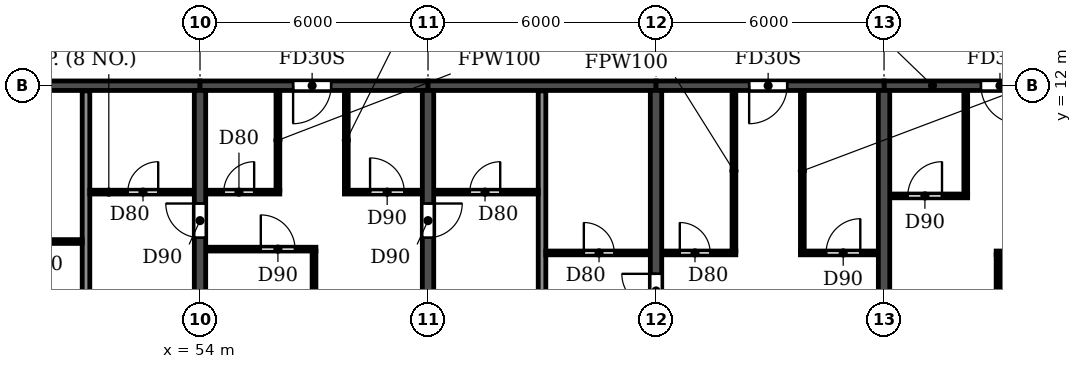
"""IFC4 building model, lengths in metres.
Left out: names, types, materials, properties, quantities, classifications, styles, units other than length and angle.
Written with IfcOpenShell. Run it as: python <this file> out.ifc"""

import sys

from ifc_helpers import new_model, si_unit, direction, frame, frame_2d, origin, place, context, subcontext, project, spatial, rectangle, extrude, element, fill, save


model = new_model("IFC4")
c1 = context("Model", 3, precision=1e-05, world=origin(), true_north=direction((0.0, 1.0)))
c2 = subcontext(c1, "Body", "Model", "MODEL_VIEW")
j1 = project(units=[si_unit("LENGTHUNIT", "METRE"), si_unit("PLANEANGLEUNIT", "RADIAN")], contexts=[c1])
p1 = place(None, origin())
s1 = spatial("IfcSite", under=j1, at=p1, CompositionType="ELEMENT")
p2 = place(p1, origin())
s2 = spatial("IfcBuilding", under=s1, at=p2, CompositionType="ELEMENT")
p3 = place(p2, frame((0.0, 0.0, 162.0)))
s3 = spatial("IfcBuildingStorey", under=s2, at=p3, CompositionType="ELEMENT", Elevation=162.0)
p4 = place(p3, frame((54.0, 0.2, 0.0), z_axis=(0.0, 0.0, 1.0), x_axis=(0.0, 1.0, 0.0)))
e1 = element("IfcWall", 1, at=p4, inside=s3, PredefinedType="SHEAR", context=c2, shape_type="SweptSolid", body=[
    extrude(rectangle(XDim=11.675, YDim=0.3, at=frame_2d((5.837, 0.0))), origin(), (0.0, 0.0, 1.0), 2.95),
])
p5 = place(p4, frame((7.8, 0.0, 0.0)))
e2 = element("IfcOpeningElement", 2, at=p5, cuts=e1, PredefinedType="OPENING", context=c2, shape_type="SweptSolid", body=[
    extrude(rectangle(XDim=0.9, YDim=2.1, at=frame_2d((0.45, 1.05))), frame((0.0, 0.16, 0.0), z_axis=(0.0, -1.0, 0.0), x_axis=(1.0, 0.0, 0.0)), (0.0, 0.0, 1.0), 0.32),
])
p6 = place(p3, frame((60.0, 0.2, 0.0), z_axis=(0.0, 0.0, 1.0), x_axis=(0.0, 1.0, 0.0)))
e3 = element("IfcWall", 3, at=p6, inside=s3, PredefinedType="SHEAR", context=c2, shape_type="SweptSolid", body=[
    extrude(rectangle(XDim=11.675, YDim=0.3, at=frame_2d((5.837, 0.0))), origin(), (0.0, 0.0, 1.0), 2.95),
])
p7 = place(p6, frame((7.8, 0.0, 0.0)))
e4 = element("IfcOpeningElement", 4, at=p7, cuts=e3, PredefinedType="OPENING", context=c2, shape_type="SweptSolid", body=[
    extrude(rectangle(XDim=0.9, YDim=2.1, at=frame_2d((0.45, 1.05))), frame((0.0, 0.16, 0.0), z_axis=(0.0, -1.0, 0.0), x_axis=(1.0, 0.0, 0.0)), (0.0, 0.0, 1.0), 0.32),
])
p8 = place(p3, frame((66.0, 0.2, 0.0), z_axis=(0.0, 0.0, 1.0), x_axis=(0.0, 1.0, 0.0)))
e5 = element("IfcWall", 5, at=p8, inside=s3, PredefinedType="SHEAR", context=c2, shape_type="SweptSolid", body=[
    extrude(rectangle(XDim=11.675, YDim=0.3, at=frame_2d((5.837, 0.0))), origin(), (0.0, 0.0, 1.0), 2.95),
])
p9 = place(p8, frame((5.95, 0.0, 0.0)))
e6 = element("IfcOpeningElement", 6, at=p9, cuts=e5, PredefinedType="OPENING", context=c2, shape_type="SweptSolid", body=[
    extrude(rectangle(XDim=0.9, YDim=2.1, at=frame_2d((0.45, 1.05))), frame((0.0, 0.16, 0.0), z_axis=(0.0, -1.0, 0.0), x_axis=(1.0, 0.0, 0.0)), (0.0, 0.0, 1.0), 0.32),
])
p10 = place(p3, frame((72.0, 0.2, 0.0), z_axis=(0.0, 0.0, 1.0), x_axis=(0.0, 1.0, 0.0)))
e7 = element("IfcWall", 7, at=p10, inside=s3, PredefinedType="SHEAR", context=c2, shape_type="SweptSolid", body=[
    extrude(rectangle(XDim=11.675, YDim=0.3, at=frame_2d((5.837, 0.0))), origin(), (0.0, 0.0, 1.0), 2.95),
])
p11 = place(p3, frame((48.0, 12.0, 0.0), z_axis=(0.0, 0.0, 1.0), x_axis=(1.0, 0.0, 0.0)))
e8 = element("IfcWall", 8, at=p11, inside=s3, PredefinedType="SHEAR", context=c2, shape_type="SweptSolid", body=[
    extrude(rectangle(XDim=6.0, YDim=0.25, at=frame_2d((3.0, 0.0))), origin(), (0.0, 0.0, 1.0), 2.35),
])
p12 = place(p3, frame((54.0, 12.0, 0.0), z_axis=(0.0, 0.0, 1.0), x_axis=(1.0, 0.0, 0.0)))
e9 = element("IfcWall", 9, at=p12, inside=s3, PredefinedType="SHEAR", context=c2, shape_type="SweptSolid", body=[
    extrude(rectangle(XDim=6.0, YDim=0.25, at=frame_2d((3.0, 0.0))), origin(), (0.0, 0.0, 1.0), 2.35),
])
p13 = place(p12, frame((2.45, 0.0, 0.0)))
e10 = element("IfcOpeningElement", 10, at=p13, cuts=e9, PredefinedType="OPENING", context=c2, shape_type="SweptSolid", body=[
    extrude(rectangle(XDim=1.0, YDim=2.1, at=frame_2d((0.5, 1.05))), frame((0.0, 0.135, 0.0), z_axis=(0.0, -1.0, 0.0), x_axis=(1.0, 0.0, 0.0)), (0.0, 0.0, 1.0), 0.27),
])
p14 = place(p3, frame((60.0, 12.0, 0.0), z_axis=(0.0, 0.0, 1.0), x_axis=(1.0, 0.0, 0.0)))
e11 = element("IfcWall", 11, at=p14, inside=s3, PredefinedType="SHEAR", context=c2, shape_type="SweptSolid", body=[
    extrude(rectangle(XDim=6.0, YDim=0.25, at=frame_2d((3.0, 0.0))), origin(), (0.0, 0.0, 1.0), 2.35),
])
p15 = place(p3, frame((66.0, 12.0, 0.0), z_axis=(0.0, 0.0, 1.0), x_axis=(1.0, 0.0, 0.0)))
e12 = element("IfcWall", 12, at=p15, inside=s3, PredefinedType="SHEAR", context=c2, shape_type="SweptSolid", body=[
    extrude(rectangle(XDim=6.0, YDim=0.25, at=frame_2d((3.0, 0.0))), origin(), (0.0, 0.0, 1.0), 2.35),
])
p16 = place(p15, frame((2.45, 0.0, 0.0)))
e13 = element("IfcOpeningElement", 13, at=p16, cuts=e12, PredefinedType="OPENING", context=c2, shape_type="SweptSolid", body=[
    extrude(rectangle(XDim=1.0, YDim=2.1, at=frame_2d((0.5, 1.05))), frame((0.0, 0.135, 0.0), z_axis=(0.0, -1.0, 0.0), x_axis=(1.0, 0.0, 0.0)), (0.0, 0.0, 1.0), 0.27),
])
p17 = place(p3, frame((72.0, 12.0, 0.0), z_axis=(0.0, 0.0, 1.0), x_axis=(1.0, 0.0, 0.0)))
e14 = element("IfcWall", 14, at=p17, inside=s3, PredefinedType="SHEAR", context=c2, shape_type="SweptSolid", body=[
    extrude(rectangle(XDim=6.0, YDim=0.25, at=frame_2d((3.0, 0.0))), origin(), (0.0, 0.0, 1.0), 2.35),
])
p18 = place(p17, frame((2.55, 0.0, 0.0)))
e15 = element("IfcOpeningElement", 15, at=p18, cuts=e14, PredefinedType="OPENING", context=c2, shape_type="SweptSolid", body=[
    extrude(rectangle(XDim=1.0, YDim=2.1, at=frame_2d((0.5, 1.05))), frame((0.0, 0.135, 0.0), z_axis=(0.0, -1.0, 0.0), x_axis=(1.0, 0.0, 0.0)), (0.0, 0.0, 1.0), 0.27),
])
for number, where, z_axis, x_axis in (
    (16, (51.0, 0.06, 0.0), (0.0, 0.0, 1.0), (0.0, 1.0, 0.0)),
    (17, (63.0, 0.06, 0.0), (0.0, 0.0, 1.0), (0.0, 1.0, 0.0)),
):
    element("IfcWall", number, at=place(p3, frame(where, z_axis=z_axis, x_axis=x_axis)), inside=s3, PredefinedType="PARTITIONING", context=c2, shape_type="SweptSolid", body=[
        extrude(rectangle(XDim=11.805, YDim=0.2, at=frame_2d((5.902, 0.0))), origin(), (0.0, 0.0, 1.0), 2.95),
    ])
p19 = place(p3, frame((63.1, 7.6, 0.0), z_axis=(0.0, 0.0, 1.0), x_axis=(1.0, 0.0, 0.0)))
e18 = element("IfcWall", 18, at=p19, inside=s3, PredefinedType="PARTITIONING", context=c2, shape_type="SweptSolid", body=[
    extrude(rectangle(XDim=2.74, YDim=0.1, at=frame_2d((1.37, 0.0))), origin(), (0.0, 0.0, 1.0), 2.95),
])
p20 = place(p19, frame((1.0, 0.0, 0.0)))
e19 = element("IfcOpeningElement", 19, at=p20, cuts=e18, PredefinedType="OPENING", context=c2, shape_type="SweptSolid", body=[
    extrude(rectangle(XDim=0.8, YDim=2.1, at=frame_2d((0.4, 1.05))), frame((0.0, 0.06, 0.0), z_axis=(0.0, -1.0, 0.0), x_axis=(1.0, 0.0, 0.0)), (0.0, 0.0, 1.0), 0.12),
])
p21 = place(p3, frame((66.16, 7.6, 0.0), z_axis=(0.0, 0.0, 1.0), x_axis=(1.0, 0.0, 0.0)))
e20 = element("IfcWall", 20, at=p21, inside=s3, PredefinedType="PARTITIONING", context=c2, shape_type="SweptSolid", body=[
    extrude(rectangle(XDim=1.94, YDim=0.1, at=frame_2d((0.97, 0.0))), origin(), (0.0, 0.0, 1.0), 2.95),
])
p22 = place(p21, frame((0.465, 0.0, 0.0)))
e21 = element("IfcOpeningElement", 21, at=p22, cuts=e20, PredefinedType="OPENING", context=c2, shape_type="SweptSolid", body=[
    extrude(rectangle(XDim=0.8, YDim=2.1, at=frame_2d((0.4, 1.05))), frame((0.0, 0.06, 0.0), z_axis=(0.0, -1.0, 0.0), x_axis=(1.0, 0.0, 0.0)), (0.0, 0.0, 1.0), 0.12),
])
p23 = place(p3, frame((69.8, 7.6, 0.0), z_axis=(0.0, 0.0, 1.0), x_axis=(1.0, 0.0, 0.0)))
e22 = element("IfcWall", 22, at=p23, inside=s3, PredefinedType="PARTITIONING", context=c2, shape_type="SweptSolid", body=[
    extrude(rectangle(XDim=2.04, YDim=0.1, at=frame_2d((1.02, 0.0))), origin(), (0.0, 0.0, 1.0), 2.95),
])
p24 = place(p23, frame((0.675, 0.0, 0.0)))
e23 = element("IfcOpeningElement", 23, at=p24, cuts=e22, PredefinedType="OPENING", context=c2, shape_type="SweptSolid", body=[
    extrude(rectangle(XDim=0.9, YDim=2.1, at=frame_2d((0.45, 1.05))), frame((0.0, 0.06, 0.0), z_axis=(0.0, -1.0, 0.0), x_axis=(1.0, 0.0, 0.0)), (0.0, 0.0, 1.0), 0.12),
])
p25 = place(p3, frame((74.95, 7.6, 0.0), z_axis=(0.0, 0.0, 1.0), x_axis=(1.0, 0.0, 0.0)))
e24 = element("IfcWall", 24, at=p25, inside=s3, PredefinedType="PARTITIONING", context=c2, shape_type="SweptSolid", body=[
    extrude(rectangle(XDim=2.89, YDim=0.1, at=frame_2d((1.445, 0.0))), origin(), (0.0, 0.0, 1.0), 2.95),
])
p26 = place(p25, frame((0.55, 0.0, 0.0)))
e25 = element("IfcOpeningElement", 25, at=p26, cuts=e24, PredefinedType="OPENING", context=c2, shape_type="SweptSolid", body=[
    extrude(rectangle(XDim=0.9, YDim=2.1, at=frame_2d((0.45, 1.05))), frame((0.0, 0.06, 0.0), z_axis=(0.0, -1.0, 0.0), x_axis=(1.0, 0.0, 0.0)), (0.0, 0.0, 1.0), 0.12),
])
p27 = place(p3, frame((54.16, 7.7, 0.0), z_axis=(0.0, 0.0, 1.0), x_axis=(1.0, 0.0, 0.0)))
e26 = element("IfcWall", 26, at=p27, inside=s3, PredefinedType="PARTITIONING", context=c2, shape_type="SweptSolid", body=[
    extrude(rectangle(XDim=2.89, YDim=0.1, at=frame_2d((1.445, 0.0))), origin(), (0.0, 0.0, 1.0), 2.95),
])
p28 = place(p27, frame((1.44, 0.0, 0.0)))
e27 = element("IfcOpeningElement", 27, at=p28, cuts=e26, PredefinedType="OPENING", context=c2, shape_type="SweptSolid", body=[
    extrude(rectangle(XDim=0.9, YDim=2.1, at=frame_2d((0.45, 1.05))), frame((0.0, 0.06, 0.0), z_axis=(0.0, -1.0, 0.0), x_axis=(1.0, 0.0, 0.0)), (0.0, 0.0, 1.0), 0.12),
])
p29 = place(p3, frame((48.16, 7.9, 0.0), z_axis=(0.0, 0.0, 1.0), x_axis=(1.0, 0.0, 0.0)))
e28 = element("IfcWall", 28, at=p29, inside=s3, PredefinedType="PARTITIONING", context=c2, shape_type="SweptSolid", body=[
    extrude(rectangle(XDim=2.74, YDim=0.1, at=frame_2d((1.37, 0.0))), origin(), (0.0, 0.0, 1.0), 2.95),
])
p30 = place(p29, frame((0.94, 0.0, 0.0)))
e29 = element("IfcOpeningElement", 29, at=p30, cuts=e28, PredefinedType="OPENING", context=c2, shape_type="SweptSolid", body=[
    extrude(rectangle(XDim=0.8, YDim=2.1, at=frame_2d((0.4, 1.05))), frame((0.0, 0.06, 0.0), z_axis=(0.0, -1.0, 0.0), x_axis=(1.0, 0.0, 0.0)), (0.0, 0.0, 1.0), 0.12),
])
p31 = place(p3, frame((72.16, 9.1, 0.0), z_axis=(0.0, 0.0, 1.0), x_axis=(1.0, 0.0, 0.0)))
e30 = element("IfcWall", 30, at=p31, inside=s3, PredefinedType="PARTITIONING", context=c2, shape_type="SweptSolid", body=[
    extrude(rectangle(XDim=2.04, YDim=0.1, at=frame_2d((1.02, 0.0))), origin(), (0.0, 0.0, 1.0), 2.95),
])
p32 = place(p31, frame((0.465, 0.0, 0.0)))
e31 = element("IfcOpeningElement", 31, at=p32, cuts=e30, PredefinedType="OPENING", context=c2, shape_type="SweptSolid", body=[
    extrude(rectangle(XDim=0.9, YDim=2.1, at=frame_2d((0.45, 1.05))), frame((0.0, 0.06, 0.0), z_axis=(0.0, -1.0, 0.0), x_axis=(1.0, 0.0, 0.0)), (0.0, 0.0, 1.0), 0.12),
])
p33 = place(p3, frame((51.1, 9.2, 0.0), z_axis=(0.0, 0.0, 1.0), x_axis=(1.0, 0.0, 0.0)))
e32 = element("IfcWall", 32, at=p33, inside=s3, PredefinedType="PARTITIONING", context=c2, shape_type="SweptSolid", body=[
    extrude(rectangle(XDim=2.74, YDim=0.1, at=frame_2d((1.37, 0.0))), origin(), (0.0, 0.0, 1.0), 2.95),
])
p34 = place(p33, frame((1.0, 0.0, 0.0)))
e33 = element("IfcOpeningElement", 33, at=p34, cuts=e32, PredefinedType="OPENING", context=c2, shape_type="SweptSolid", body=[
    extrude(rectangle(XDim=0.8, YDim=2.1, at=frame_2d((0.4, 1.05))), frame((0.0, 0.06, 0.0), z_axis=(0.0, -1.0, 0.0), x_axis=(1.0, 0.0, 0.0)), (0.0, 0.0, 1.0), 0.12),
])
p35 = place(p3, frame((54.16, 9.2, 0.0), z_axis=(0.0, 0.0, 1.0), x_axis=(1.0, 0.0, 0.0)))
e34 = element("IfcWall", 34, at=p35, inside=s3, PredefinedType="PARTITIONING", context=c2, shape_type="SweptSolid", body=[
    extrude(rectangle(XDim=1.94, YDim=0.1, at=frame_2d((0.97, 0.0))), origin(), (0.0, 0.0, 1.0), 2.95),
])
p36 = place(p35, frame((0.465, 0.0, 0.0)))
e35 = element("IfcOpeningElement", 35, at=p36, cuts=e34, PredefinedType="OPENING", context=c2, shape_type="SweptSolid", body=[
    extrude(rectangle(XDim=0.8, YDim=2.1, at=frame_2d((0.4, 1.05))), frame((0.0, 0.06, 0.0), z_axis=(0.0, -1.0, 0.0), x_axis=(1.0, 0.0, 0.0)), (0.0, 0.0, 1.0), 0.12),
])
p37 = place(p3, frame((57.8, 9.2, 0.0), z_axis=(0.0, 0.0, 1.0), x_axis=(1.0, 0.0, 0.0)))
e36 = element("IfcWall", 36, at=p37, inside=s3, PredefinedType="PARTITIONING", context=c2, shape_type="SweptSolid", body=[
    extrude(rectangle(XDim=2.04, YDim=0.1, at=frame_2d((1.02, 0.0))), origin(), (0.0, 0.0, 1.0), 2.95),
])
p38 = place(p37, frame((0.675, 0.0, 0.0)))
e37 = element("IfcOpeningElement", 37, at=p38, cuts=e36, PredefinedType="OPENING", context=c2, shape_type="SweptSolid", body=[
    extrude(rectangle(XDim=0.9, YDim=2.1, at=frame_2d((0.45, 1.05))), frame((0.0, 0.06, 0.0), z_axis=(0.0, -1.0, 0.0), x_axis=(1.0, 0.0, 0.0)), (0.0, 0.0, 1.0), 0.12),
])
p39 = place(p3, frame((60.16, 9.2, 0.0), z_axis=(0.0, 0.0, 1.0), x_axis=(1.0, 0.0, 0.0)))
e38 = element("IfcWall", 38, at=p39, inside=s3, PredefinedType="PARTITIONING", context=c2, shape_type="SweptSolid", body=[
    extrude(rectangle(XDim=2.74, YDim=0.1, at=frame_2d((1.37, 0.0))), origin(), (0.0, 0.0, 1.0), 2.95),
])
p40 = place(p39, frame((0.94, 0.0, 0.0)))
e39 = element("IfcOpeningElement", 39, at=p40, cuts=e38, PredefinedType="OPENING", context=c2, shape_type="SweptSolid", body=[
    extrude(rectangle(XDim=0.8, YDim=2.1, at=frame_2d((0.4, 1.05))), frame((0.0, 0.06, 0.0), z_axis=(0.0, -1.0, 0.0), x_axis=(1.0, 0.0, 0.0)), (0.0, 0.0, 1.0), 0.12),
])
p41 = place(p3, frame((56.05, 9.25, 0.0), z_axis=(0.0, 0.0, 1.0), x_axis=(0.0, 1.0, 0.0)))
e40 = element("IfcWall", 40, at=p41, inside=s3, PredefinedType="PARTITIONING", context=c2, shape_type="SweptSolid", body=[
    extrude(rectangle(XDim=2.615, YDim=0.1, at=frame_2d((1.308, 0.0))), origin(), (0.0, 0.0, 1.0), 2.95),
])
p42 = place(p3, frame((57.0, 0.06, 0.0), z_axis=(0.0, 0.0, 1.0), x_axis=(0.0, 1.0, 0.0)))
e41 = element("IfcWall", 41, at=p42, inside=s3, PredefinedType="PARTITIONING", context=c2, shape_type="SweptSolid", body=[
    extrude(rectangle(XDim=7.59, YDim=0.1, at=frame_2d((3.795, 0.0))), origin(), (0.0, 0.0, 1.0), 2.95),
])
p43 = place(p3, frame((57.85, 9.25, 0.0), z_axis=(0.0, 0.0, 1.0), x_axis=(0.0, 1.0, 0.0)))
e42 = element("IfcWall", 42, at=p43, inside=s3, PredefinedType="PARTITIONING", context=c2, shape_type="SweptSolid", body=[
    extrude(rectangle(XDim=2.615, YDim=0.1, at=frame_2d((1.308, 0.0))), origin(), (0.0, 0.0, 1.0), 2.95),
])
for number, where, z_axis, x_axis in (
    (43, (68.05, 7.65, 0.0), (0.0, 0.0, 1.0), (0.0, 1.0, 0.0)),
    (44, (69.85, 7.65, 0.0), (0.0, 0.0, 1.0), (0.0, 1.0, 0.0)),
):
    element("IfcWall", number, at=place(p3, frame(where, z_axis=z_axis, x_axis=x_axis)), inside=s3, PredefinedType="PARTITIONING", context=c2, shape_type="SweptSolid", body=[
        extrude(rectangle(XDim=4.215, YDim=0.1, at=frame_2d((2.107, 0.0))), origin(), (0.0, 0.0, 1.0), 2.95),
    ])
p44 = place(p3, frame((74.15, 9.15, 0.0), z_axis=(0.0, 0.0, 1.0), x_axis=(0.0, 1.0, 0.0)))
e45 = element("IfcWall", 45, at=p44, inside=s3, PredefinedType="PARTITIONING", context=c2, shape_type="SweptSolid", body=[
    extrude(rectangle(XDim=2.715, YDim=0.1, at=frame_2d((1.357, 0.0))), origin(), (0.0, 0.0, 1.0), 2.95),
])
p45 = place(p3, frame((75.0, 0.06, 0.0), z_axis=(0.0, 0.0, 1.0), x_axis=(0.0, 1.0, 0.0)))
e46 = element("IfcWall", 46, at=p45, inside=s3, PredefinedType="PARTITIONING", context=c2, shape_type="SweptSolid", body=[
    extrude(rectangle(XDim=7.49, YDim=0.1, at=frame_2d((3.745, 0.0))), origin(), (0.0, 0.0, 1.0), 2.95),
])
p46 = place(p34, origin())
e47 = element("IfcDoor", 47, at=p46, inside=s3, OperationType="SINGLE_SWING_RIGHT", PredefinedType="DOOR", context=c2, shape_type="SweptSolid", body=[
    extrude(rectangle(XDim=0.8, YDim=2.1, at=frame_2d((0.4, 1.05))), frame((0.0, 0.025, 0.0), z_axis=(0.0, -1.0, 0.0), x_axis=(1.0, 0.0, 0.0)), (0.0, 0.0, 1.0), 0.05),
])
fill(e33, e47)
p47 = place(p40, origin())
e48 = element("IfcDoor", 48, at=p47, inside=s3, OperationType="SINGLE_SWING_RIGHT", PredefinedType="DOOR", context=c2, shape_type="SweptSolid", body=[
    extrude(rectangle(XDim=0.8, YDim=2.1, at=frame_2d((0.4, 1.05))), frame((0.0, 0.025, 0.0), z_axis=(0.0, -1.0, 0.0), x_axis=(1.0, 0.0, 0.0)), (0.0, 0.0, 1.0), 0.05),
])
fill(e39, e48)
p48 = place(p5, origin())
e49 = element("IfcDoor", 49, at=p48, inside=s3, OperationType="SINGLE_SWING_RIGHT", PredefinedType="DOOR", context=c2, shape_type="SweptSolid", body=[
    extrude(rectangle(XDim=0.9, YDim=2.1, at=frame_2d((0.45, 1.05))), frame((0.0, 0.025, 0.0), z_axis=(0.0, -1.0, 0.0), x_axis=(1.0, 0.0, 0.0)), (0.0, 0.0, 1.0), 0.05),
])
fill(e2, e49)
p49 = place(p36, origin())
e50 = element("IfcDoor", 50, at=p49, inside=s3, OperationType="SINGLE_SWING_RIGHT", PredefinedType="DOOR", context=c2, shape_type="SweptSolid", body=[
    extrude(rectangle(XDim=0.8, YDim=2.1, at=frame_2d((0.4, 1.05))), frame((0.0, 0.025, 0.0), z_axis=(0.0, -1.0, 0.0), x_axis=(1.0, 0.0, 0.0)), (0.0, 0.0, 1.0), 0.05),
])
fill(e35, e50)
p50 = place(p28, origin())
e51 = element("IfcDoor", 51, at=p50, inside=s3, OperationType="SINGLE_SWING_LEFT", PredefinedType="DOOR", context=c2, shape_type="SweptSolid", body=[
    extrude(rectangle(XDim=0.9, YDim=2.1, at=frame_2d((0.45, 1.05))), frame((0.0, 0.025, 0.0), z_axis=(0.0, -1.0, 0.0), x_axis=(1.0, 0.0, 0.0)), (0.0, 0.0, 1.0), 0.05),
])
fill(e27, e51)
p51 = place(p13, frame((1.0, 0.0, 0.0), z_axis=(0.0, 0.0, 1.0), x_axis=(-1.0, 0.0, 0.0)))
e52 = element("IfcDoor", 52, at=p51, inside=s3, OperationType="SINGLE_SWING_RIGHT", PredefinedType="DOOR", context=c2, shape_type="SweptSolid", body=[
    extrude(rectangle(XDim=1.0, YDim=2.1, at=frame_2d((0.5, 1.05))), frame((0.0, 0.025, 0.0), z_axis=(0.0, -1.0, 0.0), x_axis=(1.0, 0.0, 0.0)), (0.0, 0.0, 1.0), 0.05),
])
fill(e10, e52)
p52 = place(p38, origin())
e53 = element("IfcDoor", 53, at=p52, inside=s3, OperationType="SINGLE_SWING_LEFT", PredefinedType="DOOR", context=c2, shape_type="SweptSolid", body=[
    extrude(rectangle(XDim=0.9, YDim=2.1, at=frame_2d((0.45, 1.05))), frame((0.0, 0.025, 0.0), z_axis=(0.0, -1.0, 0.0), x_axis=(1.0, 0.0, 0.0)), (0.0, 0.0, 1.0), 0.05),
])
fill(e37, e53)
p53 = place(p7, frame((0.9, 0.0, 0.0), z_axis=(0.0, 0.0, 1.0), x_axis=(-1.0, 0.0, 0.0)))
e54 = element("IfcDoor", 54, at=p53, inside=s3, OperationType="SINGLE_SWING_LEFT", PredefinedType="DOOR", context=c2, shape_type="SweptSolid", body=[
    extrude(rectangle(XDim=0.9, YDim=2.1, at=frame_2d((0.45, 1.05))), frame((0.0, 0.025, 0.0), z_axis=(0.0, -1.0, 0.0), x_axis=(1.0, 0.0, 0.0)), (0.0, 0.0, 1.0), 0.05),
])
fill(e4, e54)
p54 = place(p20, origin())
e55 = element("IfcDoor", 55, at=p54, inside=s3, OperationType="SINGLE_SWING_LEFT", PredefinedType="DOOR", context=c2, shape_type="SweptSolid", body=[
    extrude(rectangle(XDim=0.8, YDim=2.1, at=frame_2d((0.4, 1.05))), frame((0.0, 0.025, 0.0), z_axis=(0.0, -1.0, 0.0), x_axis=(1.0, 0.0, 0.0)), (0.0, 0.0, 1.0), 0.05),
])
fill(e19, e55)
p55 = place(p9, origin())
e56 = element("IfcDoor", 56, at=p55, inside=s3, OperationType="SINGLE_SWING_RIGHT", PredefinedType="DOOR", context=c2, shape_type="SweptSolid", body=[
    extrude(rectangle(XDim=0.9, YDim=2.1, at=frame_2d((0.45, 1.05))), frame((0.0, 0.025, 0.0), z_axis=(0.0, -1.0, 0.0), x_axis=(1.0, 0.0, 0.0)), (0.0, 0.0, 1.0), 0.05),
])
fill(e6, e56)
p56 = place(p22, origin())
e57 = element("IfcDoor", 57, at=p56, inside=s3, OperationType="SINGLE_SWING_LEFT", PredefinedType="DOOR", context=c2, shape_type="SweptSolid", body=[
    extrude(rectangle(XDim=0.8, YDim=2.1, at=frame_2d((0.4, 1.05))), frame((0.0, 0.025, 0.0), z_axis=(0.0, -1.0, 0.0), x_axis=(1.0, 0.0, 0.0)), (0.0, 0.0, 1.0), 0.05),
])
fill(e21, e57)
p57 = place(p16, frame((1.0, 0.0, 0.0), z_axis=(0.0, 0.0, 1.0), x_axis=(-1.0, 0.0, 0.0)))
e58 = element("IfcDoor", 58, at=p57, inside=s3, OperationType="SINGLE_SWING_RIGHT", PredefinedType="DOOR", context=c2, shape_type="SweptSolid", body=[
    extrude(rectangle(XDim=1.0, YDim=2.1, at=frame_2d((0.5, 1.05))), frame((0.0, 0.025, 0.0), z_axis=(0.0, -1.0, 0.0), x_axis=(1.0, 0.0, 0.0)), (0.0, 0.0, 1.0), 0.05),
])
fill(e13, e58)
p58 = place(p24, origin())
e59 = element("IfcDoor", 59, at=p58, inside=s3, OperationType="SINGLE_SWING_RIGHT", PredefinedType="DOOR", context=c2, shape_type="SweptSolid", body=[
    extrude(rectangle(XDim=0.9, YDim=2.1, at=frame_2d((0.45, 1.05))), frame((0.0, 0.025, 0.0), z_axis=(0.0, -1.0, 0.0), x_axis=(1.0, 0.0, 0.0)), (0.0, 0.0, 1.0), 0.05),
])
fill(e23, e59)
p59 = place(p32, origin())
e60 = element("IfcDoor", 60, at=p59, inside=s3, OperationType="SINGLE_SWING_RIGHT", PredefinedType="DOOR", context=c2, shape_type="SweptSolid", body=[
    extrude(rectangle(XDim=0.9, YDim=2.1, at=frame_2d((0.45, 1.05))), frame((0.0, 0.025, 0.0), z_axis=(0.0, -1.0, 0.0), x_axis=(1.0, 0.0, 0.0)), (0.0, 0.0, 1.0), 0.05),
])
fill(e31, e60)
p60 = place(p18, frame((1.0, 0.0, 0.0), z_axis=(0.0, 0.0, 1.0), x_axis=(-1.0, 0.0, 0.0)))
e61 = element("IfcDoor", 61, at=p60, inside=s3, OperationType="SINGLE_SWING_LEFT", PredefinedType="DOOR", context=c2, shape_type="SweptSolid", body=[
    extrude(rectangle(XDim=1.0, YDim=2.1, at=frame_2d((0.5, 1.05))), frame((0.0, 0.025, 0.0), z_axis=(0.0, -1.0, 0.0), x_axis=(1.0, 0.0, 0.0)), (0.0, 0.0, 1.0), 0.05),
])
fill(e15, e61)
save(model, sys.argv[1])
